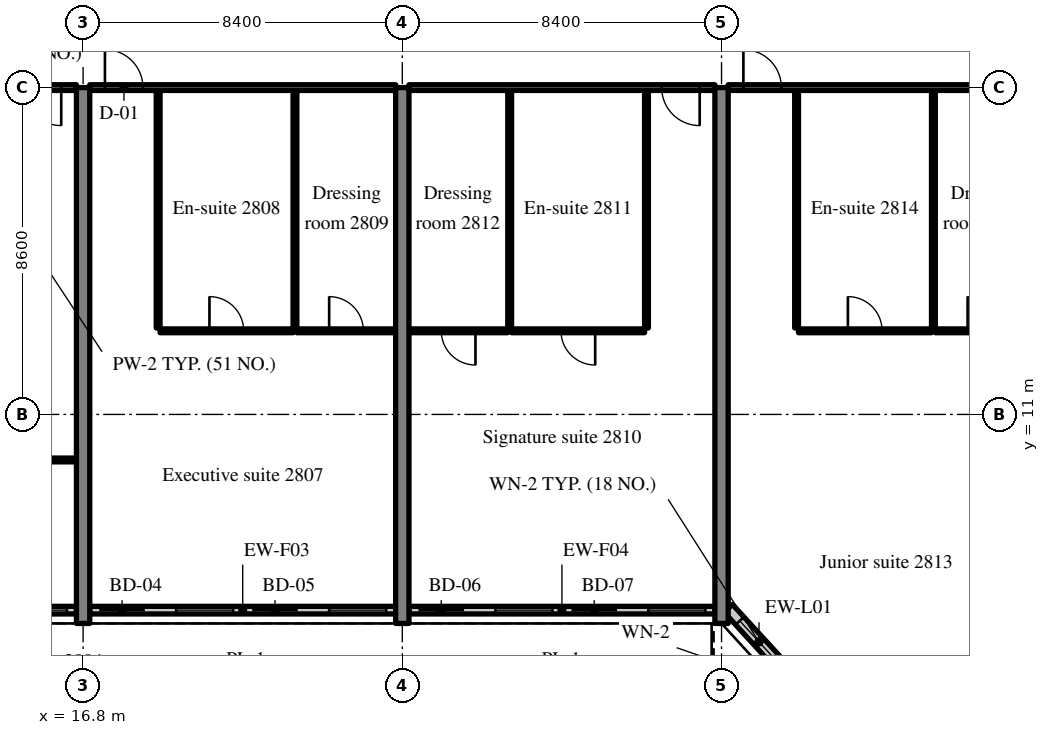
"""IFC4 building model, lengths in metres.
Left out: names, types, materials, properties, quantities, classifications, styles, units other than length and angle.
Written with IfcOpenShell. Run it as: python <this file> out.ifc"""

import sys

from ifc_helpers import new_model, si_unit, direction, frame, frame_2d, origin, place, context, subcontext, project, spatial, rectangle, extrude, source, transform, mapped, element, fill, save


model = new_model("IFC4")
c1 = context("Model", 3, precision=1e-05, world=origin(), true_north=direction((0.0, 1.0)))
c2 = subcontext(c1, "Body", "Model", "MODEL_VIEW")
j1 = project(units=[si_unit("LENGTHUNIT", "METRE"), si_unit("PLANEANGLEUNIT", "RADIAN")], contexts=[c1])
p1 = place(None, origin())
s1 = spatial("IfcSite", under=j1, at=p1, CompositionType="ELEMENT")
p2 = place(p1, origin())
s2 = spatial("IfcBuilding", under=s1, at=p2, CompositionType="ELEMENT")
p3 = place(p2, frame((0.0, 0.0, 118.0)))
s3 = spatial("IfcBuildingStorey", under=s2, at=p3, CompositionType="ELEMENT", Elevation=118.0)
m1 = source(origin(), c2, "Body", "SweptSolid", [
    extrude(rectangle(XDim=14.1, YDim=0.35, at=frame_2d((7.05, 0.0))), origin(), (0.0, 0.0, 1.0), 3.52),
])
for number, where, z_axis, x_axis in (
    (1, (16.8, 5.5, 0.0), (0.0, 0.0, 1.0), (0.0, 1.0, 0.0)),
    (2, (25.2, 5.5, 0.0), (0.0, 0.0, 1.0), (0.0, 1.0, 0.0)),
    (3, (33.6, 5.5, 0.0), (0.0, 0.0, 1.0), (0.0, 1.0, 0.0)),
):
    element("IfcWall", number, at=place(p3, frame(where, z_axis=z_axis, x_axis=x_axis)), inside=s3, PredefinedType="SHEAR", context=c2, shape_type="MappedRepresentation", body=[
        mapped(m1, transform((0.0, 0.0, 0.0), scale=1.0)),
    ])
m2 = source(origin(), c2, "Body", "SweptSolid", [
    extrude(rectangle(XDim=8.05, YDim=0.2, at=frame_2d((4.025, 0.0))), origin(), (0.0, 0.0, 1.0), 2.82),
])
p4 = place(p3, frame((8.575, 5.85, 0.0), z_axis=(0.0, 0.0, 1.0), x_axis=(1.0, 0.0, 0.0)))
e4 = element("IfcWall", 4, at=p4, inside=s3, PredefinedType="SOLIDWALL", context=c2, shape_type="MappedRepresentation", body=[
    mapped(m2, transform((0.0, 0.0, 0.0), scale=1.0)),
])
m3 = source(origin(), c2, "Body", "SweptSolid", [
    extrude(rectangle(XDim=1.2, YDim=2.4, at=frame_2d((0.6, 1.2))), frame((0.0, 0.11, 0.0), z_axis=(0.0, -1.0, 0.0), x_axis=(1.0, 0.0, 0.0)), (0.0, 0.0, 1.0), 0.22),
])
p5 = place(p4, frame((0.25, 0.0, 0.0)))
e5 = element("IfcOpeningElement", 5, at=p5, cuts=e4, PredefinedType="OPENING", context=c2, shape_type="MappedRepresentation", body=[
    mapped(m3, transform((0.0, 0.0, 0.0), scale=1.0)),
])
m4 = source(origin(), c2, "Body", "SweptSolid", [
    extrude(rectangle(XDim=1.5, YDim=1.5, at=frame_2d((0.75, 0.75))), frame((0.0, 0.11, 0.0), z_axis=(0.0, -1.0, 0.0), x_axis=(1.0, 0.0, 0.0)), (0.0, 0.0, 1.0), 0.22),
])
p6 = place(p4, frame((2.275, 0.0, 0.9)))
e6 = element("IfcOpeningElement", 6, at=p6, cuts=e4, PredefinedType="OPENING", context=c2, shape_type="MappedRepresentation", body=[
    mapped(m4, transform((0.0, 0.0, 0.0), scale=1.0)),
])
p7 = place(p4, frame((4.275, 0.0, 0.0)))
e7 = element("IfcOpeningElement", 7, at=p7, cuts=e4, PredefinedType="OPENING", context=c2, shape_type="MappedRepresentation", body=[
    mapped(m3, transform((0.0, 0.0, 0.0), scale=1.0)),
])
p8 = place(p4, frame((6.3, 0.0, 0.9)))
e8 = element("IfcOpeningElement", 8, at=p8, cuts=e4, PredefinedType="OPENING", context=c2, shape_type="MappedRepresentation", body=[
    mapped(m4, transform((0.0, 0.0, 0.0), scale=1.0)),
])
m5 = source(origin(), c2, "Body", "SweptSolid", [
    extrude(rectangle(XDim=8.05, YDim=0.2, at=frame_2d((4.025, 0.0))), origin(), (0.0, 0.0, 1.0), 2.82),
])
p9 = place(p3, frame((16.975, 5.85, 0.0), z_axis=(0.0, 0.0, 1.0), x_axis=(1.0, 0.0, 0.0)))
e9 = element("IfcWall", 9, at=p9, inside=s3, PredefinedType="SOLIDWALL", context=c2, shape_type="MappedRepresentation", body=[
    mapped(m5, transform((0.0, 0.0, 0.0), scale=1.0)),
])
p10 = place(p9, frame((0.25, 0.0, 0.0)))
e10 = element("IfcOpeningElement", 10, at=p10, cuts=e9, PredefinedType="OPENING", context=c2, shape_type="MappedRepresentation", body=[
    mapped(m3, transform((0.0, 0.0, 0.0), scale=1.0)),
])
p11 = place(p9, frame((2.275, 0.0, 0.9)))
e11 = element("IfcOpeningElement", 11, at=p11, cuts=e9, PredefinedType="OPENING", context=c2, shape_type="MappedRepresentation", body=[
    mapped(m4, transform((0.0, 0.0, 0.0), scale=1.0)),
])
p12 = place(p9, frame((4.275, 0.0, 0.0)))
e12 = element("IfcOpeningElement", 12, at=p12, cuts=e9, PredefinedType="OPENING", context=c2, shape_type="MappedRepresentation", body=[
    mapped(m3, transform((0.0, 0.0, 0.0), scale=1.0)),
])
p13 = place(p9, frame((6.3, 0.0, 0.9)))
e13 = element("IfcOpeningElement", 13, at=p13, cuts=e9, PredefinedType="OPENING", context=c2, shape_type="MappedRepresentation", body=[
    mapped(m4, transform((0.0, 0.0, 0.0), scale=1.0)),
])
p14 = place(p3, frame((25.375, 5.85, 0.0), z_axis=(0.0, 0.0, 1.0), x_axis=(1.0, 0.0, 0.0)))
e14 = element("IfcWall", 14, at=p14, inside=s3, PredefinedType="SOLIDWALL", context=c2, shape_type="MappedRepresentation", body=[
    mapped(m2, transform((0.0, 0.0, 0.0), scale=1.0)),
])
p15 = place(p14, frame((0.25, 0.0, 0.0)))
e15 = element("IfcOpeningElement", 15, at=p15, cuts=e14, PredefinedType="OPENING", context=c2, shape_type="MappedRepresentation", body=[
    mapped(m3, transform((0.0, 0.0, 0.0), scale=1.0)),
])
p16 = place(p14, frame((2.275, 0.0, 0.9)))
e16 = element("IfcOpeningElement", 16, at=p16, cuts=e14, PredefinedType="OPENING", context=c2, shape_type="MappedRepresentation", body=[
    mapped(m4, transform((0.0, 0.0, 0.0), scale=1.0)),
])
p17 = place(p14, frame((4.275, 0.0, 0.0)))
e17 = element("IfcOpeningElement", 17, at=p17, cuts=e14, PredefinedType="OPENING", context=c2, shape_type="MappedRepresentation", body=[
    mapped(m3, transform((0.0, 0.0, 0.0), scale=1.0)),
])
p18 = place(p14, frame((6.3, 0.0, 0.9)))
e18 = element("IfcOpeningElement", 18, at=p18, cuts=e14, PredefinedType="OPENING", context=c2, shape_type="MappedRepresentation", body=[
    mapped(m4, transform((0.0, 0.0, 0.0), scale=1.0)),
])
m6 = source(origin(), c2, "Body", "SweptSolid", [
    extrude(rectangle(XDim=2.398, YDim=0.3, at=frame_2d((1.199, 0.0))), origin(), (0.0, 0.0, 1.0), 3.52),
])
p19 = place(p3, frame((33.776, 5.9, 0.0), z_axis=(0.0, 0.0, 1.0), x_axis=(0.675374189419, -0.737475222815, 0.0)))
e19 = element("IfcWall", 19, at=p19, inside=s3, PredefinedType="SOLIDWALL", context=c2, shape_type="MappedRepresentation", body=[
    mapped(m6, transform((0.0, 0.0, 0.0), scale=1.0)),
])
m7 = source(origin(), c2, "Body", "SweptSolid", [
    extrude(rectangle(XDim=1.5, YDim=2.0, at=frame_2d((0.75, 1.0))), frame((0.0, 0.16, 0.0), z_axis=(0.0, -1.0, 0.0), x_axis=(1.0, 0.0, 0.0)), (0.0, 0.0, 1.0), 0.32),
])
p20 = place(p19, frame((0.449, 0.0, 0.9)))
e20 = element("IfcOpeningElement", 20, at=p20, cuts=e19, PredefinedType="OPENING", context=c2, shape_type="MappedRepresentation", body=[
    mapped(m7, transform((0.0, 0.0, 0.0), scale=1.0)),
])
m8 = source(origin(), c2, "Body", "SweptSolid", [
    extrude(rectangle(XDim=8.05, YDim=0.1, at=frame_2d((4.025, 0.0))), origin(), (0.0, 0.0, 1.0), 3.52),
])
p21 = place(p3, frame((8.575, 9.802, 0.0), z_axis=(0.0, 0.0, 1.0), x_axis=(1.0, 0.0, 0.0)))
e21 = element("IfcWall", 21, at=p21, inside=s3, PredefinedType="PARTITIONING", context=c2, shape_type="MappedRepresentation", body=[
    mapped(m8, transform((0.0, 0.0, 0.0), scale=1.0)),
])
m9 = source(origin(), c2, "Body", "SweptSolid", [
    extrude(rectangle(XDim=1.8, YDim=2.1, at=frame_2d((0.9, 1.05))), frame((0.0, 0.06, 0.0), z_axis=(0.0, -1.0, 0.0), x_axis=(1.0, 0.0, 0.0)), (0.0, 0.0, 1.0), 0.12),
])
p22 = place(p21, frame((3.125, 0.0, 0.0)))
e22 = element("IfcOpeningElement", 22, at=p22, cuts=e21, PredefinedType="OPENING", context=c2, shape_type="MappedRepresentation", body=[
    mapped(m9, transform((0.0, 0.0, 0.0), scale=1.0)),
])
m10 = source(origin(), c2, "Body", "SweptSolid", [
    extrude(rectangle(XDim=8.05, YDim=0.15, at=frame_2d((4.025, 0.0))), origin(), (0.0, 0.0, 1.0), 2.82),
])
p23 = place(p3, frame((8.575, 19.6, 0.0), z_axis=(0.0, 0.0, 1.0), x_axis=(1.0, 0.0, 0.0)))
e23 = element("IfcWall", 23, at=p23, inside=s3, PredefinedType="PARTITIONING", context=c2, shape_type="MappedRepresentation", body=[
    mapped(m10, transform((0.0, 0.0, 0.0), scale=1.0)),
])
m11 = source(origin(), c2, "Body", "SweptSolid", [
    extrude(rectangle(XDim=1.0, YDim=2.1, at=frame_2d((0.5, 1.05))), frame((0.0, 0.085, 0.0), z_axis=(0.0, -1.0, 0.0), x_axis=(1.0, 0.0, 0.0)), (0.0, 0.0, 1.0), 0.17),
])
p24 = place(p23, frame((6.65, 0.0, 0.0)))
e24 = element("IfcOpeningElement", 24, at=p24, cuts=e23, PredefinedType="OPENING", context=c2, shape_type="MappedRepresentation", body=[
    mapped(m11, transform((0.0, 0.0, 0.0), scale=1.0)),
])
m12 = source(origin(), c2, "Body", "SweptSolid", [
    extrude(rectangle(XDim=6.25, YDim=0.1, at=frame_2d((3.125, 0.0))), origin(), (0.0, 0.0, 1.0), 3.52),
])
for number, where, z_axis, x_axis in (
    (25, (18.775, 13.275, 0.0), (0.0, 0.0, 1.0), (0.0, 1.0, 0.0)),
    (26, (22.375, 13.275, 0.0), (0.0, 0.0, 1.0), (0.0, 1.0, 0.0)),
):
    element("IfcWall", number, at=place(p3, frame(where, z_axis=z_axis, x_axis=x_axis)), inside=s3, PredefinedType="PARTITIONING", context=c2, shape_type="MappedRepresentation", body=[
        mapped(m12, transform((0.0, 0.0, 0.0), scale=1.0)),
    ])
m13 = source(origin(), c2, "Body", "SweptSolid", [
    extrude(rectangle(XDim=3.5, YDim=0.1, at=frame_2d((1.75, 0.0))), origin(), (0.0, 0.0, 1.0), 3.52),
])
p25 = place(p3, frame((18.825, 13.2, 0.0), z_axis=(0.0, 0.0, 1.0), x_axis=(1.0, 0.0, 0.0)))
e27 = element("IfcWall", 27, at=p25, inside=s3, PredefinedType="PARTITIONING", context=c2, shape_type="MappedRepresentation", body=[
    mapped(m13, transform((0.0, 0.0, 0.0), scale=1.0)),
])
m14 = source(origin(), c2, "Body", "SweptSolid", [
    extrude(rectangle(XDim=0.9, YDim=2.1, at=frame_2d((0.45, 1.05))), frame((0.0, 0.06, 0.0), z_axis=(0.0, -1.0, 0.0), x_axis=(1.0, 0.0, 0.0)), (0.0, 0.0, 1.0), 0.12),
])
p26 = place(p25, frame((1.3, 0.0, 0.0)))
e28 = element("IfcOpeningElement", 28, at=p26, cuts=e27, PredefinedType="OPENING", context=c2, shape_type="MappedRepresentation", body=[
    mapped(m14, transform((0.0, 0.0, 0.0), scale=1.0)),
])
m15 = source(origin(), c2, "Body", "SweptSolid", [
    extrude(rectangle(XDim=2.6, YDim=0.1, at=frame_2d((1.3, 0.0))), origin(), (0.0, 0.0, 1.0), 3.52),
])
p27 = place(p3, frame((22.425, 13.2, 0.0), z_axis=(0.0, 0.0, 1.0), x_axis=(1.0, 0.0, 0.0)))
e29 = element("IfcWall", 29, at=p27, inside=s3, PredefinedType="PARTITIONING", context=c2, shape_type="MappedRepresentation", body=[
    mapped(m15, transform((0.0, 0.0, 0.0), scale=1.0)),
])
p28 = place(p27, frame((0.85, 0.0, 0.0)))
e30 = element("IfcOpeningElement", 30, at=p28, cuts=e29, PredefinedType="OPENING", context=c2, shape_type="MappedRepresentation", body=[
    mapped(m14, transform((0.0, 0.0, 0.0), scale=1.0)),
])
m16 = source(origin(), c2, "Body", "SweptSolid", [
    extrude(rectangle(XDim=8.05, YDim=0.15, at=frame_2d((4.025, 0.0))), origin(), (0.0, 0.0, 1.0), 2.82),
])
p29 = place(p3, frame((16.975, 19.6, 0.0), z_axis=(0.0, 0.0, 1.0), x_axis=(1.0, 0.0, 0.0)))
e31 = element("IfcWall", 31, at=p29, inside=s3, PredefinedType="PARTITIONING", context=c2, shape_type="MappedRepresentation", body=[
    mapped(m16, transform((0.0, 0.0, 0.0), scale=1.0)),
])
p30 = place(p29, frame((0.4, 0.0, 0.0)))
e32 = element("IfcOpeningElement", 32, at=p30, cuts=e31, PredefinedType="OPENING", context=c2, shape_type="MappedRepresentation", body=[
    mapped(m11, transform((0.0, 0.0, 0.0), scale=1.0)),
])
for number, where, z_axis, x_axis in (
    (33, (31.625, 13.275, 0.0), (0.0, 0.0, 1.0), (0.0, 1.0, 0.0)),
    (34, (28.025, 13.275, 0.0), (0.0, 0.0, 1.0), (0.0, 1.0, 0.0)),
):
    element("IfcWall", number, at=place(p3, frame(where, z_axis=z_axis, x_axis=x_axis)), inside=s3, PredefinedType="PARTITIONING", context=c2, shape_type="MappedRepresentation", body=[
        mapped(m12, transform((0.0, 0.0, 0.0), scale=1.0)),
    ])
p31 = place(p3, frame((28.075, 13.2, 0.0), z_axis=(0.0, 0.0, 1.0), x_axis=(1.0, 0.0, 0.0)))
e35 = element("IfcWall", 35, at=p31, inside=s3, PredefinedType="PARTITIONING", context=c2, shape_type="MappedRepresentation", body=[
    mapped(m13, transform((0.0, 0.0, 0.0), scale=1.0)),
])
p32 = place(p31, frame((1.3, 0.0, 0.0)))
e36 = element("IfcOpeningElement", 36, at=p32, cuts=e35, PredefinedType="OPENING", context=c2, shape_type="MappedRepresentation", body=[
    mapped(m14, transform((0.0, 0.0, 0.0), scale=1.0)),
])
m17 = source(origin(), c2, "Body", "SweptSolid", [
    extrude(rectangle(XDim=2.6, YDim=0.1, at=frame_2d((1.3, 0.0))), origin(), (0.0, 0.0, 1.0), 3.52),
])
p33 = place(p3, frame((25.375, 13.2, 0.0), z_axis=(0.0, 0.0, 1.0), x_axis=(1.0, 0.0, 0.0)))
e37 = element("IfcWall", 37, at=p33, inside=s3, PredefinedType="PARTITIONING", context=c2, shape_type="MappedRepresentation", body=[
    mapped(m17, transform((0.0, 0.0, 0.0), scale=1.0)),
])
p34 = place(p33, frame((0.85, 0.0, 0.0)))
e38 = element("IfcOpeningElement", 38, at=p34, cuts=e37, PredefinedType="OPENING", context=c2, shape_type="MappedRepresentation", body=[
    mapped(m14, transform((0.0, 0.0, 0.0), scale=1.0)),
])
p35 = place(p3, frame((25.375, 19.6, 0.0), z_axis=(0.0, 0.0, 1.0), x_axis=(1.0, 0.0, 0.0)))
e39 = element("IfcWall", 39, at=p35, inside=s3, PredefinedType="PARTITIONING", context=c2, shape_type="MappedRepresentation", body=[
    mapped(m10, transform((0.0, 0.0, 0.0), scale=1.0)),
])
p36 = place(p35, frame((6.65, 0.0, 0.0)))
e40 = element("IfcOpeningElement", 40, at=p36, cuts=e39, PredefinedType="OPENING", context=c2, shape_type="MappedRepresentation", body=[
    mapped(m11, transform((0.0, 0.0, 0.0), scale=1.0)),
])
for number, where, z_axis, x_axis in (
    (41, (35.575, 13.275, 0.0), (0.0, 0.0, 1.0), (0.0, 1.0, 0.0)),
    (42, (39.175, 13.275, 0.0), (0.0, 0.0, 1.0), (0.0, 1.0, 0.0)),
):
    element("IfcWall", number, at=place(p3, frame(where, z_axis=z_axis, x_axis=x_axis)), inside=s3, PredefinedType="PARTITIONING", context=c2, shape_type="MappedRepresentation", body=[
        mapped(m12, transform((0.0, 0.0, 0.0), scale=1.0)),
    ])
p37 = place(p3, frame((35.625, 13.2, 0.0), z_axis=(0.0, 0.0, 1.0), x_axis=(1.0, 0.0, 0.0)))
e43 = element("IfcWall", 43, at=p37, inside=s3, PredefinedType="PARTITIONING", context=c2, shape_type="MappedRepresentation", body=[
    mapped(m13, transform((0.0, 0.0, 0.0), scale=1.0)),
])
p38 = place(p37, frame((1.3, 0.0, 0.0)))
e44 = element("IfcOpeningElement", 44, at=p38, cuts=e43, PredefinedType="OPENING", context=c2, shape_type="MappedRepresentation", body=[
    mapped(m14, transform((0.0, 0.0, 0.0), scale=1.0)),
])
p39 = place(p3, frame((39.225, 13.2, 0.0), z_axis=(0.0, 0.0, 1.0), x_axis=(1.0, 0.0, 0.0)))
e45 = element("IfcWall", 45, at=p39, inside=s3, PredefinedType="PARTITIONING", context=c2, shape_type="MappedRepresentation", body=[
    mapped(m15, transform((0.0, 0.0, 0.0), scale=1.0)),
])
p40 = place(p39, frame((0.85, 0.0, 0.0)))
e46 = element("IfcOpeningElement", 46, at=p40, cuts=e45, PredefinedType="OPENING", context=c2, shape_type="MappedRepresentation", body=[
    mapped(m14, transform((0.0, 0.0, 0.0), scale=1.0)),
])
p41 = place(p3, frame((33.775, 19.6, 0.0), z_axis=(0.0, 0.0, 1.0), x_axis=(1.0, 0.0, 0.0)))
e47 = element("IfcWall", 47, at=p41, inside=s3, PredefinedType="PARTITIONING", context=c2, shape_type="MappedRepresentation", body=[
    mapped(m10, transform((0.0, 0.0, 0.0), scale=1.0)),
])
p42 = place(p41, frame((0.4, 0.0, 0.0)))
e48 = element("IfcOpeningElement", 48, at=p42, cuts=e47, PredefinedType="OPENING", context=c2, shape_type="MappedRepresentation", body=[
    mapped(m11, transform((0.0, 0.0, 0.0), scale=1.0)),
])
m18 = source(origin(), c2, "Body", "SweptSolid", [
    extrude(rectangle(XDim=1.5, YDim=1.5, at=frame_2d((0.75, 0.75))), frame((0.0, 0.03, 0.0), z_axis=(0.0, -1.0, 0.0), x_axis=(1.0, 0.0, 0.0)), (0.0, 0.0, 1.0), 0.06),
])
p43 = place(p8, origin())
e49 = element("IfcWindow", 49, at=p43, inside=s3, PartitioningType="SINGLE_PANEL", PredefinedType="WINDOW", context=c2, shape_type="MappedRepresentation", body=[
    mapped(m18, transform((0.0, 0.0, 0.0), scale=1.0)),
])
fill(e8, e49)
m19 = source(origin(), c2, "Body", "SweptSolid", [
    extrude(rectangle(XDim=1.2, YDim=2.4, at=frame_2d((0.6, 1.2))), frame((0.0, 0.025, 0.0), z_axis=(0.0, -1.0, 0.0), x_axis=(1.0, 0.0, 0.0)), (0.0, 0.0, 1.0), 0.05),
])
p44 = place(p10, origin())
e50 = element("IfcDoor", 50, at=p44, inside=s3, OperationType="SLIDING_TO_RIGHT", PredefinedType="DOOR", context=c2, shape_type="MappedRepresentation", body=[
    mapped(m19, transform((0.0, 0.0, 0.0), scale=1.0)),
])
fill(e10, e50)
p45 = place(p11, origin())
e51 = element("IfcWindow", 51, at=p45, inside=s3, PartitioningType="SINGLE_PANEL", PredefinedType="WINDOW", context=c2, shape_type="MappedRepresentation", body=[
    mapped(m18, transform((0.0, 0.0, 0.0), scale=1.0)),
])
fill(e11, e51)
p46 = place(p12, origin())
e52 = element("IfcDoor", 52, at=p46, inside=s3, OperationType="SLIDING_TO_LEFT", PredefinedType="DOOR", context=c2, shape_type="MappedRepresentation", body=[
    mapped(m19, transform((0.0, 0.0, 0.0), scale=1.0)),
])
fill(e12, e52)
p47 = place(p13, origin())
e53 = element("IfcWindow", 53, at=p47, inside=s3, PartitioningType="SINGLE_PANEL", PredefinedType="WINDOW", context=c2, shape_type="MappedRepresentation", body=[
    mapped(m18, transform((0.0, 0.0, 0.0), scale=1.0)),
])
fill(e13, e53)
p48 = place(p15, origin())
e54 = element("IfcDoor", 54, at=p48, inside=s3, OperationType="SLIDING_TO_RIGHT", PredefinedType="DOOR", context=c2, shape_type="MappedRepresentation", body=[
    mapped(m19, transform((0.0, 0.0, 0.0), scale=1.0)),
])
fill(e15, e54)
p49 = place(p16, origin())
e55 = element("IfcWindow", 55, at=p49, inside=s3, PartitioningType="SINGLE_PANEL", PredefinedType="WINDOW", context=c2, shape_type="MappedRepresentation", body=[
    mapped(m18, transform((0.0, 0.0, 0.0), scale=1.0)),
])
fill(e16, e55)
p50 = place(p17, origin())
e56 = element("IfcDoor", 56, at=p50, inside=s3, OperationType="SLIDING_TO_LEFT", PredefinedType="DOOR", context=c2, shape_type="MappedRepresentation", body=[
    mapped(m19, transform((0.0, 0.0, 0.0), scale=1.0)),
])
fill(e17, e56)
p51 = place(p18, origin())
e57 = element("IfcWindow", 57, at=p51, inside=s3, PartitioningType="SINGLE_PANEL", PredefinedType="WINDOW", context=c2, shape_type="MappedRepresentation", body=[
    mapped(m18, transform((0.0, 0.0, 0.0), scale=1.0)),
])
fill(e18, e57)
m20 = source(origin(), c2, "Body", "SweptSolid", [
    extrude(rectangle(XDim=1.5, YDim=2.0, at=frame_2d((0.75, 1.0))), frame((0.0, 0.03, 0.0), z_axis=(0.0, -1.0, 0.0), x_axis=(1.0, 0.0, 0.0)), (0.0, 0.0, 1.0), 0.06),
])
p52 = place(p20, origin())
e58 = element("IfcWindow", 58, at=p52, inside=s3, PartitioningType="SINGLE_PANEL", PredefinedType="WINDOW", context=c2, shape_type="MappedRepresentation", body=[
    mapped(m20, transform((0.0, 0.0, 0.0), scale=1.0)),
])
fill(e20, e58)
m21 = source(origin(), c2, "Body", "SweptSolid", [
    extrude(rectangle(XDim=1.0, YDim=2.1, at=frame_2d((0.5, 1.05))), frame((0.0, 0.025, 0.0), z_axis=(0.0, -1.0, 0.0), x_axis=(1.0, 0.0, 0.0)), (0.0, 0.0, 1.0), 0.05),
])
p53 = place(p24, origin())
e59 = element("IfcDoor", 59, at=p53, inside=s3, OperationType="SINGLE_SWING_RIGHT", PredefinedType="DOOR", context=c2, shape_type="MappedRepresentation", body=[
    mapped(m21, transform((0.0, 0.0, 0.0), scale=1.0)),
])
fill(e24, e59)
m22 = source(origin(), c2, "Body", "SweptSolid", [
    extrude(rectangle(XDim=0.9, YDim=2.1, at=frame_2d((0.45, 1.05))), frame((0.0, 0.025, 0.0), z_axis=(0.0, -1.0, 0.0), x_axis=(1.0, 0.0, 0.0)), (0.0, 0.0, 1.0), 0.05),
])
p54 = place(p26, origin())
e60 = element("IfcDoor", 60, at=p54, inside=s3, OperationType="SINGLE_SWING_LEFT", PredefinedType="DOOR", context=c2, shape_type="MappedRepresentation", body=[
    mapped(m22, transform((0.0, 0.0, 0.0), scale=1.0)),
])
fill(e28, e60)
p55 = place(p28, origin())
e61 = element("IfcDoor", 61, at=p55, inside=s3, OperationType="SINGLE_SWING_LEFT", PredefinedType="DOOR", context=c2, shape_type="MappedRepresentation", body=[
    mapped(m22, transform((0.0, 0.0, 0.0), scale=1.0)),
])
fill(e30, e61)
p56 = place(p30, origin())
e62 = element("IfcDoor", 62, at=p56, inside=s3, OperationType="SINGLE_SWING_LEFT", PredefinedType="DOOR", context=c2, shape_type="MappedRepresentation", body=[
    mapped(m21, transform((0.0, 0.0, 0.0), scale=1.0)),
])
fill(e32, e62)
p57 = place(p32, origin())
e63 = element("IfcDoor", 63, at=p57, inside=s3, OperationType="SINGLE_SWING_RIGHT", PredefinedType="DOOR", context=c2, shape_type="MappedRepresentation", body=[
    mapped(m22, transform((0.0, 0.0, 0.0), scale=1.0)),
])
fill(e36, e63)
p58 = place(p34, origin())
e64 = element("IfcDoor", 64, at=p58, inside=s3, OperationType="SINGLE_SWING_RIGHT", PredefinedType="DOOR", context=c2, shape_type="MappedRepresentation", body=[
    mapped(m22, transform((0.0, 0.0, 0.0), scale=1.0)),
])
fill(e38, e64)
p59 = place(p36, origin())
e65 = element("IfcDoor", 65, at=p59, inside=s3, OperationType="SINGLE_SWING_RIGHT", PredefinedType="DOOR", context=c2, shape_type="MappedRepresentation", body=[
    mapped(m21, transform((0.0, 0.0, 0.0), scale=1.0)),
])
fill(e40, e65)
p60 = place(p38, origin())
e66 = element("IfcDoor", 66, at=p60, inside=s3, OperationType="SINGLE_SWING_LEFT", PredefinedType="DOOR", context=c2, shape_type="MappedRepresentation", body=[
    mapped(m22, transform((0.0, 0.0, 0.0), scale=1.0)),
])
fill(e44, e66)
p61 = place(p40, origin())
e67 = element("IfcDoor", 67, at=p61, inside=s3, OperationType="SINGLE_SWING_LEFT", PredefinedType="DOOR", context=c2, shape_type="MappedRepresentation", body=[
    mapped(m22, transform((0.0, 0.0, 0.0), scale=1.0)),
])
fill(e46, e67)
p62 = place(p42, origin())
e68 = element("IfcDoor", 68, at=p62, inside=s3, OperationType="SINGLE_SWING_LEFT", PredefinedType="DOOR", context=c2, shape_type="MappedRepresentation", body=[
    mapped(m21, transform((0.0, 0.0, 0.0), scale=1.0)),
])
fill(e48, e68)
save(model, sys.argv[1])
